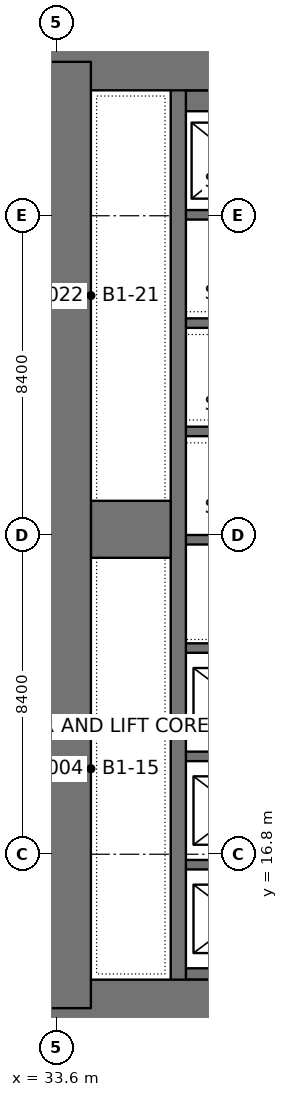
"""IFC4 building model, lengths in metres.
Left out: names, types, materials, properties, quantities, classifications, styles, units other than length and angle.
Written with IfcOpenShell. Run it as: python <this file> out.ifc"""

import sys

from ifc_helpers import new_model, si_unit, direction, frame, frame_2d, origin, place, context, subcontext, project, spatial, rectangle, extrude, element, save


model = new_model("IFC4")
c1 = context("Model", 3, precision=1e-05, world=origin(), true_north=direction((0.0, 1.0)))
c2 = subcontext(c1, "Body", "Model", "MODEL_VIEW")
j1 = project(units=[si_unit("LENGTHUNIT", "METRE"), si_unit("PLANEANGLEUNIT", "RADIAN")], contexts=[c1])
p1 = place(None, origin())
s1 = spatial("IfcSite", under=j1, at=p1, CompositionType="ELEMENT")
p2 = place(p1, origin())
s2 = spatial("IfcBuilding", under=s1, at=p2, CompositionType="ELEMENT")
p3 = place(p2, frame((0.0, 0.0, -4.2)))
s3 = spatial("IfcBuildingStorey", under=s2, at=p3, CompositionType="ELEMENT", Elevation=-4.2)
p4 = place(p3, frame((33.0, 12.75, 0.0), z_axis=(0.0, 0.0, 1.0), x_axis=(1.0, 0.0, 0.0)))
e1 = element("IfcWall", 1, at=p4, inside=s3, PredefinedType="SHEAR", context=c2, shape_type="SweptSolid", body=[
    extrude(rectangle(XDim=19.2, YDim=1.5, at=frame_2d((9.6, 0.0))), origin(), (0.0, 0.0, 1.0), 4.2),
])
p5 = place(p4, frame((7.85, 0.0, 0.0)))
e2 = element("IfcOpeningElement", 2, at=p5, cuts=e1, PredefinedType="OPENING", context=c2, shape_type="SweptSolid", body=[
    extrude(rectangle(XDim=1.8, YDim=2.4, at=frame_2d((0.9, 1.2))), frame((0.0, 0.76, 0.0), z_axis=(0.0, -1.0, 0.0), x_axis=(1.0, 0.0, 0.0)), (0.0, 0.0, 1.0), 1.52),
])
p6 = place(p3, frame((33.0, 37.65, 0.0), z_axis=(0.0, 0.0, 1.0), x_axis=(1.0, 0.0, 0.0)))
e3 = element("IfcWall", 3, at=p6, inside=s3, PredefinedType="SHEAR", context=c2, shape_type="SweptSolid", body=[
    extrude(rectangle(XDim=19.2, YDim=1.5, at=frame_2d((9.6, 0.0))), origin(), (0.0, 0.0, 1.0), 4.2),
])
p7 = place(p6, frame((7.85, 0.0, 0.0)))
e4 = element("IfcOpeningElement", 4, at=p7, cuts=e3, PredefinedType="OPENING", context=c2, shape_type="SweptSolid", body=[
    extrude(rectangle(XDim=1.8, YDim=2.4, at=frame_2d((0.9, 1.2))), frame((0.0, 0.76, 0.0), z_axis=(0.0, -1.0, 0.0), x_axis=(1.0, 0.0, 0.0)), (0.0, 0.0, 1.0), 1.52),
])
p8 = place(p3, frame((33.75, 12.75, 0.0), z_axis=(0.0, 0.0, 1.0), x_axis=(0.0, 1.0, 0.0)))
e5 = element("IfcWall", 5, at=p8, inside=s3, PredefinedType="SHEAR", context=c2, shape_type="SweptSolid", body=[
    extrude(rectangle(XDim=24.9, YDim=1.5, at=frame_2d((12.45, 0.0))), origin(), (0.0, 0.0, 1.0), 4.2),
])
p9 = place(p3, frame((36.8, 13.05, 0.0), z_axis=(0.0, 0.0, 1.0), x_axis=(0.0, 1.0, 0.0)))
e6 = element("IfcWall", 6, at=p9, inside=s3, PredefinedType="SHEAR", context=c2, shape_type="SweptSolid", body=[
    extrude(rectangle(XDim=24.3, YDim=0.4, at=frame_2d((12.15, 0.0))), origin(), (0.0, 0.0, 1.0), 4.2),
])
p10 = place(p3, frame((36.6, 25.35, 0.0), z_axis=(0.0, 0.0, 1.0), x_axis=(-1.0, 0.0, 0.0)))
e7 = element("IfcWall", 7, at=p10, inside=s3, PredefinedType="SHEAR", context=c2, shape_type="SweptSolid", body=[
    extrude(rectangle(XDim=2.1, YDim=1.5, at=frame_2d((1.05, 0.0))), origin(), (0.0, 0.0, 1.0), 4.2),
])
p11 = place(p3, frame((40.0, 13.65, 0.0), z_axis=(0.0, 0.0, 1.0), x_axis=(-1.0, 0.0, 0.0)))
e8 = element("IfcWall", 8, at=p11, inside=s3, PredefinedType="SHEAR", context=c2, shape_type="SweptSolid", body=[
    extrude(rectangle(XDim=3.2, YDim=0.3, at=frame_2d((1.6, 0.0))), origin(), (0.0, 0.0, 1.0), 4.2),
])
for number, where, z_axis, x_axis in (
    (9, (40.0, 16.525, 0.0), (0.0, 0.0, 1.0), (-1.0, 0.0, 0.0)),
    (10, (40.0, 19.375, 0.0), (0.0, 0.0, 1.0), (-1.0, 0.0, 0.0)),
    (11, (40.0, 22.225, 0.0), (0.0, 0.0, 1.0), (-1.0, 0.0, 0.0)),
    (12, (40.0, 25.075, 0.0), (0.0, 0.0, 1.0), (-1.0, 0.0, 0.0)),
    (13, (40.0, 27.925, 0.0), (0.0, 0.0, 1.0), (-1.0, 0.0, 0.0)),
    (14, (40.0, 30.775, 0.0), (0.0, 0.0, 1.0), (-1.0, 0.0, 0.0)),
    (15, (40.0, 33.625, 0.0), (0.0, 0.0, 1.0), (-1.0, 0.0, 0.0)),
):
    element("IfcWall", number, at=place(p3, frame(where, z_axis=z_axis, x_axis=x_axis)), inside=s3, PredefinedType="SHEAR", context=c2, shape_type="SweptSolid", body=[
        extrude(rectangle(XDim=3.2, YDim=0.25, at=frame_2d((1.6, 0.0))), origin(), (0.0, 0.0, 1.0), 4.2),
    ])
p12 = place(p3, frame((40.0, 36.625, 0.0), z_axis=(0.0, 0.0, 1.0), x_axis=(-1.0, 0.0, 0.0)))
e16 = element("IfcWall", 16, at=p12, inside=s3, PredefinedType="SHEAR", context=c2, shape_type="SweptSolid", body=[
    extrude(rectangle(XDim=3.2, YDim=0.55, at=frame_2d((1.6, 0.0))), origin(), (0.0, 0.0, 1.0), 4.2),
])
p13 = place(p3, frame((16.82, 25.2, 0.0), z_axis=(0.0, 0.0, 1.0), x_axis=(1.0, 0.0, 0.0)))
e17 = element("IfcWall", 17, at=p13, inside=s3, PredefinedType="PARTITIONING", context=c2, shape_type="SweptSolid", body=[
    extrude(rectangle(XDim=16.76, YDim=0.25, at=frame_2d((8.38, 0.0))), origin(), (0.0, 0.0, 1.0), 3.8),
])
p14 = place(p13, frame((3.73, 0.0, 0.0)))
e18 = element("IfcOpeningElement", 18, at=p14, cuts=e17, PredefinedType="OPENING", context=c2, shape_type="SweptSolid", body=[
    extrude(rectangle(XDim=0.9, YDim=2.2, at=frame_2d((0.45, 1.1))), frame((0.0, 0.135, 0.0), z_axis=(0.0, -1.0, 0.0), x_axis=(1.0, 0.0, 0.0)), (0.0, 0.0, 1.0), 0.27),
])
save(model, sys.argv[1])
